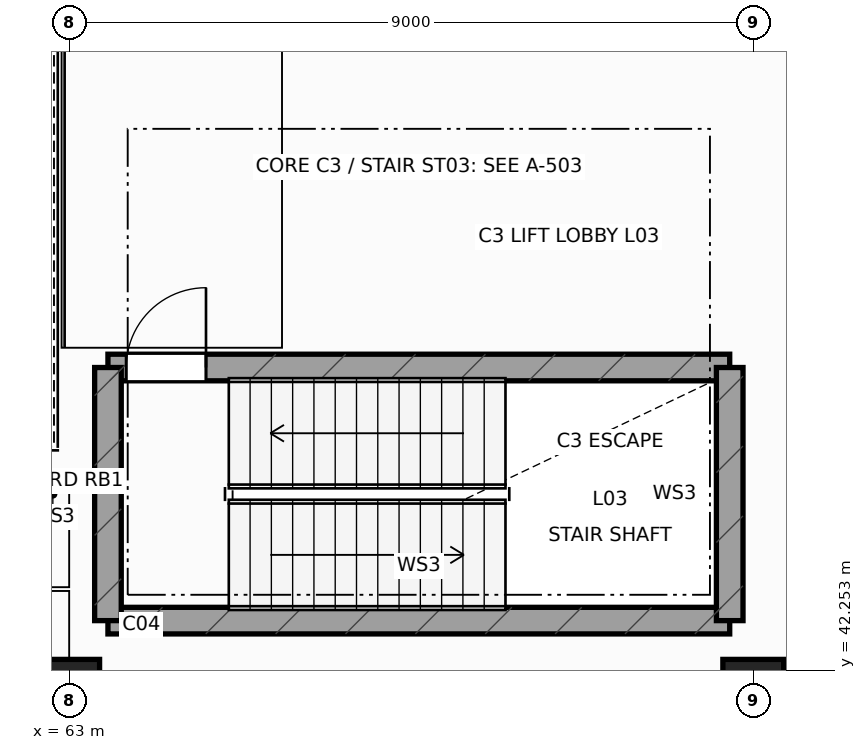
"""IFC4 building model, lengths in metres.
Left out: names, types, materials, properties, quantities, classifications, styles, units other than length and angle.
Written with IfcOpenShell. Run it as: python <this file> out.ifc"""

import sys

from ifc_helpers import new_model, si_unit, direction, frame, frame_2d, origin, origin_2d, place, context, subcontext, project, spatial, rectangle, extrude, element, fill, save


model = new_model("IFC4")
c1 = context("Model", 3, precision=1e-05, world=origin(), true_north=direction((0.0, 1.0)))
c2 = subcontext(c1, "Body", "Model", "MODEL_VIEW")
j1 = project(units=[si_unit("LENGTHUNIT", "METRE"), si_unit("PLANEANGLEUNIT", "RADIAN")], contexts=[c1])
p1 = place(None, origin())
s1 = spatial("IfcSite", under=j1, at=p1, CompositionType="ELEMENT")
p2 = place(p1, origin())
s2 = spatial("IfcBuilding", under=s1, at=p2, CompositionType="ELEMENT")
p3 = place(p2, frame((0.0, 0.0, 16.8)))
s3 = spatial("IfcBuildingStorey", under=s2, at=p3, CompositionType="ELEMENT", Elevation=16.8)
for number, where, z_axis, x_axis in (
    (1, (63.0, 42.0, 0.0), (0.0, 0.0, 1.0), (1.0, 0.0, 0.0)),
    (2, (72.0, 42.0, 0.0), (0.0, 0.0, 1.0), (1.0, 0.0, 0.0)),
):
    element("IfcColumn", number, at=place(p3, frame(where, z_axis=z_axis, x_axis=x_axis)), inside=s3, PredefinedType="COLUMN", context=c2, shape_type="SweptSolid", body=[
        extrude(rectangle(XDim=0.8, YDim=0.8, at=origin_2d()), origin(), (0.0, 0.0, 1.0), 4.8),
    ])
p4 = place(p3, frame((63.51, 42.91, 0.0), z_axis=(0.0, 0.0, 1.0), x_axis=(1.0, 0.0, 0.0)))
e3 = element("IfcWall", 3, at=p4, inside=s3, PredefinedType="SHEAR", context=c2, shape_type="SweptSolid", body=[
    extrude(rectangle(XDim=8.18, YDim=0.35, at=frame_2d((4.09, 0.0))), origin(), (0.0, 0.0, 1.0), 4.52),
])
p5 = place(p3, frame((63.51, 46.24, 0.0), z_axis=(0.0, 0.0, 1.0), x_axis=(1.0, 0.0, 0.0)))
e4 = element("IfcWall", 4, at=p5, inside=s3, PredefinedType="SHEAR", context=c2, shape_type="SweptSolid", body=[
    extrude(rectangle(XDim=8.18, YDim=0.35, at=frame_2d((4.09, 0.0))), origin(), (0.0, 0.0, 1.0), 4.52),
])
p6 = place(p5, frame((0.24, 0.0, 0.0)))
e5 = element("IfcOpeningElement", 5, at=p6, cuts=e4, PredefinedType="OPENING", context=c2, shape_type="SweptSolid", body=[
    extrude(rectangle(XDim=1.05, YDim=2.18, at=frame_2d((0.525, 1.09))), frame((0.0, 0.185, 0.0), z_axis=(0.0, -1.0, 0.0), x_axis=(1.0, 0.0, 0.0)), (0.0, 0.0, 1.0), 0.37),
])
for number, where, z_axis, x_axis in (
    (6, (63.51, 42.91, 0.0), (0.0, 0.0, 1.0), (0.0, 1.0, 0.0)),
    (7, (71.69, 42.91, 0.0), (0.0, 0.0, 1.0), (0.0, 1.0, 0.0)),
):
    element("IfcWall", number, at=place(p3, frame(where, z_axis=z_axis, x_axis=x_axis)), inside=s3, PredefinedType="SHEAR", context=c2, shape_type="SweptSolid", body=[
        extrude(rectangle(XDim=3.33, YDim=0.35, at=frame_2d((1.665, 0.0))), origin(), (0.0, 0.0, 1.0), 4.52),
    ])
p7 = place(p6, origin())
e8 = element("IfcDoor", 8, at=p7, inside=s3, OperationType="SINGLE_SWING_RIGHT", PredefinedType="DOOR", context=c2, shape_type="SweptSolid", body=[
    extrude(rectangle(XDim=1.05, YDim=2.18, at=frame_2d((0.525, 1.09))), frame((0.0, 0.025, 0.0), z_axis=(0.0, -1.0, 0.0), x_axis=(1.0, 0.0, 0.0)), (0.0, 0.0, 1.0), 0.05),
])
fill(e5, e8)
save(model, sys.argv[1])
